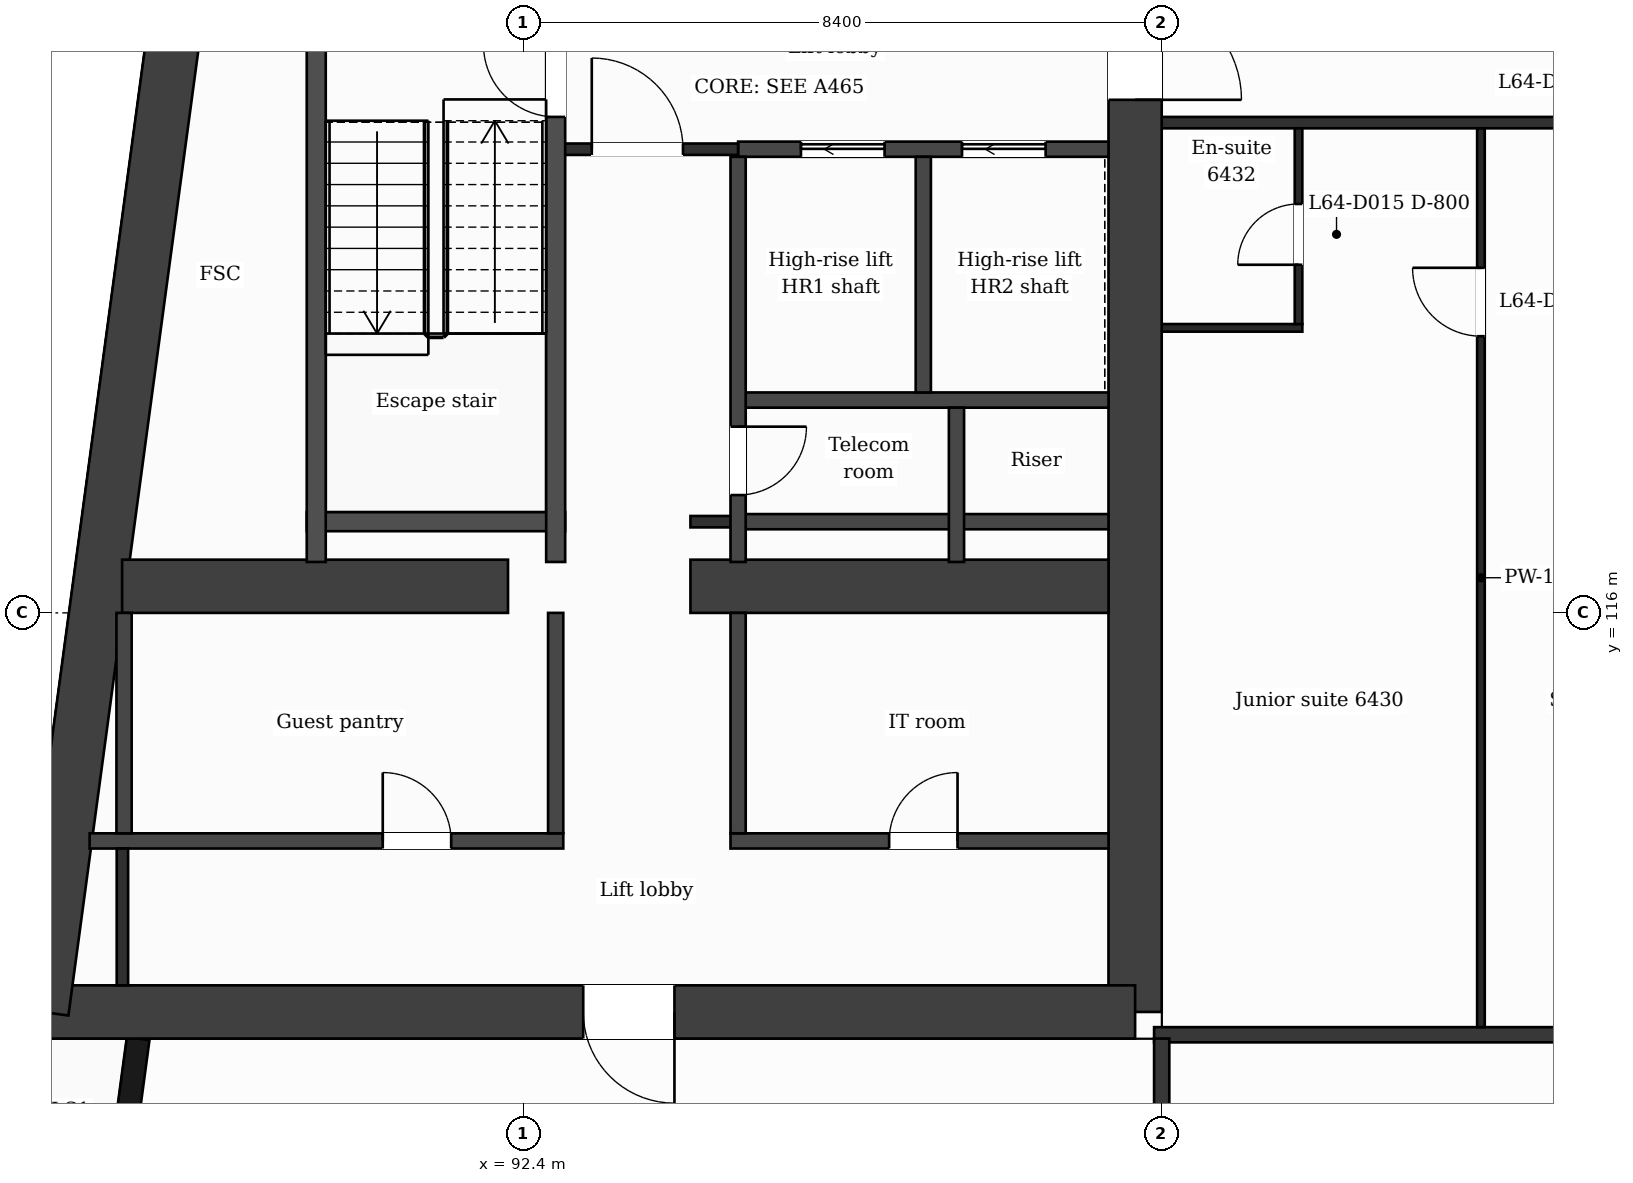
"""IFC4 building model, lengths in metres.
Left out: names, types, materials, properties, quantities, classifications, styles, units other than length and angle.
Written with IfcOpenShell. Run it as: python <this file> out.ifc"""

import sys

from ifc_helpers import new_model, si_unit, direction, frame, frame_2d, origin, place, context, subcontext, project, spatial, rectangle, extrude, element, fill, save


model = new_model("IFC4")
c1 = context("Model", 3, precision=1e-05, world=origin(), true_north=direction((0.0, 1.0)))
c2 = subcontext(c1, "Body", "Model", "MODEL_VIEW")
j1 = project(units=[si_unit("LENGTHUNIT", "METRE"), si_unit("PLANEANGLEUNIT", "RADIAN")], contexts=[c1])
p1 = place(None, origin())
s1 = spatial("IfcSite", under=j1, at=p1, CompositionType="ELEMENT")
p2 = place(p1, origin())
s2 = spatial("IfcBuilding", under=s1, at=p2, CompositionType="ELEMENT")
p3 = place(p2, frame((0.0, 0.0, 266.4)))
s3 = spatial("IfcBuildingStorey", under=s2, at=p3, CompositionType="ELEMENT", Elevation=266.4)
p4 = place(p3, frame((100.45, 132.05, 0.0), z_axis=(0.0, 0.0, 1.0), x_axis=(0.0, -1.0, 0.0)))
e1 = element("IfcWall", 1, at=p4, inside=s3, PredefinedType="SHEAR", context=c2, shape_type="SweptSolid", body=[
    extrude(rectangle(XDim=21.3, YDim=0.7, at=frame_2d((10.65, 0.0))), origin(), (0.0, 0.0, 1.0), 3.7),
])
p5 = place(p4, frame((7.9, 0.0, 0.0)))
e2 = element("IfcOpeningElement", 2, at=p5, cuts=e1, PredefinedType="OPENING", context=c2, shape_type="SweptSolid", body=[
    extrude(rectangle(XDim=1.4, YDim=2.1, at=frame_2d((0.7, 1.05))), frame((0.0, 0.36, 0.0), z_axis=(0.0, -1.0, 0.0), x_axis=(1.0, 0.0, 0.0)), (0.0, 0.0, 1.0), 0.72),
])
p6 = place(p3, frame((100.45, 110.75, 0.0), z_axis=(0.0, 0.0, 1.0), x_axis=(-1.0, 0.0, 0.0)))
e3 = element("IfcWall", 3, at=p6, inside=s3, PredefinedType="SHEAR", context=c2, shape_type="SweptSolid", body=[
    extrude(rectangle(XDim=14.38, YDim=0.7, at=frame_2d((7.19, 0.0))), origin(), (0.0, 0.0, 1.0), 3.7),
])
p7 = place(p6, frame((6.06, 0.0, 0.0)))
e4 = element("IfcOpeningElement", 4, at=p7, cuts=e3, PredefinedType="OPENING", context=c2, shape_type="SweptSolid", body=[
    extrude(rectangle(XDim=1.2, YDim=2.1, at=frame_2d((0.6, 1.05))), frame((0.0, 0.36, 0.0), z_axis=(0.0, -1.0, 0.0), x_axis=(1.0, 0.0, 0.0)), (0.0, 0.0, 1.0), 0.72),
])
p8 = place(p3, frame((86.07, 110.75, 0.0), z_axis=(0.0, 0.0, 1.0), x_axis=(0.133406218907, 0.991061441464, 0.0)))
e5 = element("IfcWall", 5, at=p8, inside=s3, PredefinedType="SHEAR", context=c2, shape_type="SweptSolid", body=[
    extrude(rectangle(XDim=21.492, YDim=0.7, at=frame_2d((10.746, 0.0))), origin(), (0.0, 0.0, 1.0), 3.7),
])
p9 = place(p3, frame((87.123, 116.35, 0.0), z_axis=(0.0, 0.0, 1.0), x_axis=(1.0, 0.0, 0.0)))
e6 = element("IfcWall", 6, at=p9, inside=s3, PredefinedType="SHEAR", context=c2, shape_type="SweptSolid", body=[
    extrude(rectangle(XDim=5.077, YDim=0.7, at=frame_2d((2.539, 0.0))), origin(), (0.0, 0.0, 1.0), 3.7),
])
p10 = place(p3, frame((94.6, 116.35, 0.0), z_axis=(0.0, 0.0, 1.0), x_axis=(1.0, 0.0, 0.0)))
e7 = element("IfcWall", 7, at=p10, inside=s3, PredefinedType="SHEAR", context=c2, shape_type="SweptSolid", body=[
    extrude(rectangle(XDim=5.5, YDim=0.7, at=frame_2d((2.75, 0.0))), origin(), (0.0, 0.0, 1.0), 3.7),
])
p11 = place(p3, frame((87.334, 110.4, 0.0), z_axis=(0.0, 0.0, 1.0), x_axis=(-0.13345962011, -0.991054251694, 0.0)))
e8 = element("IfcWall", 8, at=p11, inside=s3, PredefinedType="SOLIDWALL", context=c2, shape_type="SweptSolid", body=[
    extrude(rectangle(XDim=1.937, YDim=0.3, at=frame_2d((0.969, 0.0))), origin(), (0.0, 0.0, 1.0), 3.38),
])
p12 = place(p3, frame((100.7, 110.45, 0.0), z_axis=(0.0, 0.0, 1.0), x_axis=(1.0, 0.0, 0.0)))
e9 = element("IfcWall", 9, at=p12, inside=s3, PredefinedType="PARTITIONING", context=c2, shape_type="SweptSolid", body=[
    extrude(rectangle(XDim=25.4, YDim=0.2, at=frame_2d((12.7, 0.0))), origin(), (0.0, 0.0, 1.0), 3.38),
])
p13 = place(p3, frame((86.696, 113.0, 0.0), z_axis=(0.0, 0.0, 1.0), x_axis=(1.0, 0.0, 0.0)))
e10 = element("IfcWall", 10, at=p13, inside=s3, PredefinedType="PARTITIONING", context=c2, shape_type="SweptSolid", body=[
    extrude(rectangle(XDim=6.231, YDim=0.2, at=frame_2d((3.116, 0.0))), origin(), (0.0, 0.0, 1.0), 3.38),
])
p14 = place(p13, frame((3.856, 0.0, 0.0)))
e11 = element("IfcOpeningElement", 11, at=p14, cuts=e10, PredefinedType="OPENING", context=c2, shape_type="SweptSolid", body=[
    extrude(rectangle(XDim=0.9, YDim=2.1, at=frame_2d((0.45, 1.05))), frame((0.0, 0.11, 0.0), z_axis=(0.0, -1.0, 0.0), x_axis=(1.0, 0.0, 0.0)), (0.0, 0.0, 1.0), 0.22),
])
p15 = place(p3, frame((95.127, 113.0, 0.0), z_axis=(0.0, 0.0, 1.0), x_axis=(1.0, 0.0, 0.0)))
e12 = element("IfcWall", 12, at=p15, inside=s3, PredefinedType="PARTITIONING", context=c2, shape_type="SweptSolid", body=[
    extrude(rectangle(XDim=4.973, YDim=0.2, at=frame_2d((2.487, 0.0))), origin(), (0.0, 0.0, 1.0), 3.38),
])
p16 = place(p15, frame((2.087, 0.0, 0.0)))
e13 = element("IfcOpeningElement", 13, at=p16, cuts=e12, PredefinedType="OPENING", context=c2, shape_type="SweptSolid", body=[
    extrude(rectangle(XDim=0.9, YDim=2.1, at=frame_2d((0.45, 1.05))), frame((0.0, 0.11, 0.0), z_axis=(0.0, -1.0, 0.0), x_axis=(1.0, 0.0, 0.0)), (0.0, 0.0, 1.0), 0.22),
])
p17 = place(p3, frame((95.227, 117.2, 0.0), z_axis=(0.0, 0.0, 1.0), x_axis=(1.0, 0.0, 0.0)))
e14 = element("IfcWall", 14, at=p17, inside=s3, PredefinedType="PARTITIONING", context=c2, shape_type="SweptSolid", body=[
    extrude(rectangle(XDim=4.873, YDim=0.2, at=frame_2d((2.437, 0.0))), origin(), (0.0, 0.0, 1.0), 3.38),
])
p18 = place(p3, frame((94.6, 117.2, 0.0), z_axis=(0.0, 0.0, 1.0), x_axis=(1.0, 0.0, 0.0)))
e15 = element("IfcWall", 15, at=p18, inside=s3, PredefinedType="PARTITIONING", context=c2, shape_type="SweptSolid", body=[
    extrude(rectangle(XDim=0.627, YDim=0.15, at=frame_2d((0.313, 0.0))), origin(), (0.0, 0.0, 1.0), 3.38),
])
p19 = place(p3, frame((89.552, 117.2, 0.0), z_axis=(0.0, 0.0, 1.0), x_axis=(1.0, 0.0, 0.0)))
e16 = element("IfcWall", 16, at=p19, inside=s3, PredefinedType="PARTITIONING", context=c2, shape_type="SweptSolid", body=[
    extrude(rectangle(XDim=3.4, YDim=0.25, at=frame_2d((1.7, 0.0))), origin(), (0.0, 0.0, 1.0), 3.38),
])
p20 = place(p3, frame((95.227, 118.8, 0.0), z_axis=(0.0, 0.0, 1.0), x_axis=(1.0, 0.0, 0.0)))
e17 = element("IfcWall", 17, at=p20, inside=s3, PredefinedType="PARTITIONING", context=c2, shape_type="SweptSolid", body=[
    extrude(rectangle(XDim=4.873, YDim=0.2, at=frame_2d((2.437, 0.0))), origin(), (0.0, 0.0, 1.0), 3.38),
])
p21 = place(p3, frame((100.8, 119.75, 0.0), z_axis=(0.0, 0.0, 1.0), x_axis=(1.0, 0.0, 0.0)))
e18 = element("IfcWall", 18, at=p21, inside=s3, PredefinedType="PARTITIONING", context=c2, shape_type="SweptSolid", body=[
    extrude(rectangle(XDim=1.85, YDim=0.1, at=frame_2d((0.925, 0.0))), origin(), (0.0, 0.0, 1.0), 3.38),
])
p22 = place(p3, frame((95.227, 122.1, 0.0), z_axis=(0.0, 0.0, 1.0), x_axis=(1.0, 0.0, 0.0)))
e19 = element("IfcWall", 19, at=p22, inside=s3, PredefinedType="PARTITIONING", context=c2, shape_type="SweptSolid", body=[
    extrude(rectangle(XDim=4.873, YDim=0.2, at=frame_2d((2.437, 0.0))), origin(), (0.0, 0.0, 1.0), 3.38),
])
p23 = place(p22, frame((0.827, 0.0, 0.0)))
e20 = element("IfcOpeningElement", 20, at=p23, cuts=e19, PredefinedType="OPENING", context=c2, shape_type="SweptSolid", body=[
    extrude(rectangle(XDim=1.1, YDim=2.1, at=frame_2d((0.55, 1.05))), frame((0.0, 0.11, 0.0), z_axis=(0.0, -1.0, 0.0), x_axis=(1.0, 0.0, 0.0)), (0.0, 0.0, 1.0), 0.22),
])
p24 = place(p22, frame((2.946, 0.0, 0.0)))
e21 = element("IfcOpeningElement", 21, at=p24, cuts=e19, PredefinedType="OPENING", context=c2, shape_type="SweptSolid", body=[
    extrude(rectangle(XDim=1.1, YDim=2.1, at=frame_2d((0.55, 1.05))), frame((0.0, 0.11, 0.0), z_axis=(0.0, -1.0, 0.0), x_axis=(1.0, 0.0, 0.0)), (0.0, 0.0, 1.0), 0.22),
])
p25 = place(p3, frame((92.827, 122.1, 0.0), z_axis=(0.0, 0.0, 1.0), x_axis=(1.0, 0.0, 0.0)))
e22 = element("IfcWall", 22, at=p25, inside=s3, PredefinedType="PARTITIONING", context=c2, shape_type="SweptSolid", body=[
    extrude(rectangle(XDim=2.4, YDim=0.15, at=frame_2d((1.2, 0.0))), origin(), (0.0, 0.0, 1.0), 3.38),
])
p26 = place(p25, frame((0.475, 0.0, 0.0)))
e23 = element("IfcOpeningElement", 23, at=p26, cuts=e22, PredefinedType="OPENING", context=c2, shape_type="SweptSolid", body=[
    extrude(rectangle(XDim=1.2, YDim=2.1, at=frame_2d((0.6, 1.05))), frame((0.0, 0.085, 0.0), z_axis=(0.0, -1.0, 0.0), x_axis=(1.0, 0.0, 0.0)), (0.0, 0.0, 1.0), 0.17),
])
p27 = place(p3, frame((100.8, 122.45, 0.0), z_axis=(0.0, 0.0, 1.0), x_axis=(1.0, 0.0, 0.0)))
e24 = element("IfcWall", 24, at=p27, inside=s3, PredefinedType="PARTITIONING", context=c2, shape_type="SweptSolid", body=[
    extrude(rectangle(XDim=25.2, YDim=0.15, at=frame_2d((12.6, 0.0))), origin(), (0.0, 0.0, 1.0), 3.38),
])
p28 = place(p27, frame((5.55, 0.0, 0.0)))
e25 = element("IfcOpeningElement", 25, at=p28, cuts=e24, PredefinedType="OPENING", context=c2, shape_type="SweptSolid", body=[
    extrude(rectangle(XDim=1.0, YDim=2.1, at=frame_2d((0.5, 1.05))), frame((0.0, 0.085, 0.0), z_axis=(0.0, -1.0, 0.0), x_axis=(1.0, 0.0, 0.0)), (0.0, 0.0, 1.0), 0.17),
])
p29 = place(p27, frame((8.65, 0.0, 0.0)))
e26 = element("IfcOpeningElement", 26, at=p29, cuts=e24, PredefinedType="OPENING", context=c2, shape_type="SweptSolid", body=[
    extrude(rectangle(XDim=1.0, YDim=2.1, at=frame_2d((0.5, 1.05))), frame((0.0, 0.085, 0.0), z_axis=(0.0, -1.0, 0.0), x_axis=(1.0, 0.0, 0.0)), (0.0, 0.0, 1.0), 0.17),
])
p30 = place(p27, frame((19.83, 0.0, 0.0)))
e27 = element("IfcOpeningElement", 27, at=p30, cuts=e24, PredefinedType="OPENING", context=c2, shape_type="SweptSolid", body=[
    extrude(rectangle(XDim=1.0, YDim=2.1, at=frame_2d((0.5, 1.05))), frame((0.0, 0.085, 0.0), z_axis=(0.0, -1.0, 0.0), x_axis=(1.0, 0.0, 0.0)), (0.0, 0.0, 1.0), 0.17),
])
p31 = place(p3, frame((87.148, 113.1, 0.0), z_axis=(0.0, 0.0, 1.0), x_axis=(0.0, 1.0, 0.0)))
e28 = element("IfcWall", 28, at=p31, inside=s3, PredefinedType="PARTITIONING", context=c2, shape_type="SweptSolid", body=[
    extrude(rectangle(XDim=2.9, YDim=0.2, at=frame_2d((1.45, 0.0))), origin(), (0.0, 0.0, 1.0), 3.38),
])
p32 = place(p3, frame((87.127, 111.1, 0.0), z_axis=(0.0, 0.0, 1.0), x_axis=(0.0, 1.0, 0.0)))
e29 = element("IfcWall", 29, at=p32, inside=s3, PredefinedType="PARTITIONING", context=c2, shape_type="SweptSolid", body=[
    extrude(rectangle(XDim=1.8, YDim=0.15, at=frame_2d((0.9, 0.0))), origin(), (0.0, 0.0, 1.0), 3.38),
])
p33 = place(p3, frame((89.677, 116.67, 0.0), z_axis=(0.0, 0.0, 1.0), x_axis=(0.0, 1.0, 0.0)))
e30 = element("IfcWall", 30, at=p33, inside=s3, PredefinedType="PARTITIONING", context=c2, shape_type="SweptSolid", body=[
    extrude(rectangle(XDim=7.155, YDim=0.25, at=frame_2d((3.578, 0.0))), origin(), (0.0, 0.0, 1.0), 3.38),
])
p34 = place(p3, frame((92.827, 113.1, 0.0), z_axis=(0.0, 0.0, 1.0), x_axis=(0.0, 1.0, 0.0)))
e31 = element("IfcWall", 31, at=p34, inside=s3, PredefinedType="PARTITIONING", context=c2, shape_type="SweptSolid", body=[
    extrude(rectangle(XDim=2.9, YDim=0.2, at=frame_2d((1.45, 0.0))), origin(), (0.0, 0.0, 1.0), 3.38),
])
p35 = place(p3, frame((92.827, 116.67, 0.0), z_axis=(0.0, 0.0, 1.0), x_axis=(0.0, 1.0, 0.0)))
e32 = element("IfcWall", 32, at=p35, inside=s3, PredefinedType="PARTITIONING", context=c2, shape_type="SweptSolid", body=[
    extrude(rectangle(XDim=7.155, YDim=0.25, at=frame_2d((3.578, 0.0))), origin(), (0.0, 0.0, 1.0), 3.38),
])
p36 = place(p35, frame((5.855, 0.0, 0.0)))
e33 = element("IfcOpeningElement", 33, at=p36, cuts=e32, PredefinedType="OPENING", context=c2, shape_type="SweptSolid", body=[
    extrude(rectangle(XDim=0.95, YDim=2.1, at=frame_2d((0.475, 1.05))), frame((0.0, 0.135, 0.0), z_axis=(0.0, -1.0, 0.0), x_axis=(1.0, 0.0, 0.0)), (0.0, 0.0, 1.0), 0.27),
])
p37 = place(p3, frame((95.227, 113.1, 0.0), z_axis=(0.0, 0.0, 1.0), x_axis=(0.0, 1.0, 0.0)))
e34 = element("IfcWall", 34, at=p37, inside=s3, PredefinedType="PARTITIONING", context=c2, shape_type="SweptSolid", body=[
    extrude(rectangle(XDim=2.9, YDim=0.2, at=frame_2d((1.45, 0.0))), origin(), (0.0, 0.0, 1.0), 3.38),
])
p38 = place(p3, frame((95.227, 116.67, 0.0), z_axis=(0.0, 0.0, 1.0), x_axis=(0.0, 1.0, 0.0)))
e35 = element("IfcWall", 35, at=p38, inside=s3, PredefinedType="PARTITIONING", context=c2, shape_type="SweptSolid", body=[
    extrude(rectangle(XDim=5.33, YDim=0.2, at=frame_2d((2.665, 0.0))), origin(), (0.0, 0.0, 1.0), 3.38),
])
p39 = place(p38, frame((0.88, 0.0, 0.0)))
e36 = element("IfcOpeningElement", 36, at=p39, cuts=e35, PredefinedType="OPENING", context=c2, shape_type="SweptSolid", body=[
    extrude(rectangle(XDim=0.9, YDim=2.1, at=frame_2d((0.45, 1.05))), frame((0.0, 0.11, 0.0), z_axis=(0.0, -1.0, 0.0), x_axis=(1.0, 0.0, 0.0)), (0.0, 0.0, 1.0), 0.22),
])
p40 = place(p3, frame((97.664, 118.9, 0.0), z_axis=(0.0, 0.0, 1.0), x_axis=(0.0, 1.0, 0.0)))
e37 = element("IfcWall", 37, at=p40, inside=s3, PredefinedType="PARTITIONING", context=c2, shape_type="SweptSolid", body=[
    extrude(rectangle(XDim=3.1, YDim=0.2, at=frame_2d((1.55, 0.0))), origin(), (0.0, 0.0, 1.0), 3.38),
])
p41 = place(p3, frame((98.1, 116.67, 0.0), z_axis=(0.0, 0.0, 1.0), x_axis=(0.0, 1.0, 0.0)))
e38 = element("IfcWall", 38, at=p41, inside=s3, PredefinedType="PARTITIONING", context=c2, shape_type="SweptSolid", body=[
    extrude(rectangle(XDim=2.03, YDim=0.2, at=frame_2d((1.015, 0.0))), origin(), (0.0, 0.0, 1.0), 3.38),
])
p42 = place(p3, frame((100.8, 108.79, 0.0), z_axis=(0.0, 0.0, 1.0), x_axis=(0.0, 1.0, 0.0)))
e39 = element("IfcWall", 39, at=p42, inside=s3, PredefinedType="PARTITIONING", context=c2, shape_type="SweptSolid", body=[
    extrude(rectangle(XDim=1.61, YDim=0.2, at=frame_2d((0.805, 0.0))), origin(), (0.0, 0.0, 1.0), 3.38),
])
p43 = place(p3, frame((102.6, 119.8, 0.0), z_axis=(0.0, 0.0, 1.0), x_axis=(0.0, 1.0, 0.0)))
e40 = element("IfcWall", 40, at=p43, inside=s3, PredefinedType="PARTITIONING", context=c2, shape_type="SweptSolid", body=[
    extrude(rectangle(XDim=2.575, YDim=0.1, at=frame_2d((1.288, 0.0))), origin(), (0.0, 0.0, 1.0), 3.38),
])
p44 = place(p43, frame((0.78, 0.0, 0.0)))
e41 = element("IfcOpeningElement", 41, at=p44, cuts=e40, PredefinedType="OPENING", context=c2, shape_type="SweptSolid", body=[
    extrude(rectangle(XDim=0.8, YDim=2.1, at=frame_2d((0.4, 1.05))), frame((0.0, 0.06, 0.0), z_axis=(0.0, -1.0, 0.0), x_axis=(1.0, 0.0, 0.0)), (0.0, 0.0, 1.0), 0.12),
])
p45 = place(p3, frame((105.0, 110.55, 0.0), z_axis=(0.0, 0.0, 1.0), x_axis=(0.0, 1.0, 0.0)))
e42 = element("IfcWall", 42, at=p45, inside=s3, PredefinedType="PARTITIONING", context=c2, shape_type="SweptSolid", body=[
    extrude(rectangle(XDim=11.825, YDim=0.1, at=frame_2d((5.913, 0.0))), origin(), (0.0, 0.0, 1.0), 3.38),
])
p46 = place(p45, frame((9.09, 0.0, 0.0)))
e43 = element("IfcOpeningElement", 43, at=p46, cuts=e42, PredefinedType="OPENING", context=c2, shape_type="SweptSolid", body=[
    extrude(rectangle(XDim=0.9, YDim=2.1, at=frame_2d((0.45, 1.05))), frame((0.0, 0.06, 0.0), z_axis=(0.0, -1.0, 0.0), x_axis=(1.0, 0.0, 0.0)), (0.0, 0.0, 1.0), 0.12),
])
p47 = place(p26, origin())
e44 = element("IfcDoor", 44, at=p47, inside=s3, OperationType="SINGLE_SWING_LEFT", PredefinedType="DOOR", context=c2, shape_type="SweptSolid", body=[
    extrude(rectangle(XDim=1.2, YDim=2.1, at=frame_2d((0.6, 1.05))), frame((0.0, 0.025, 0.0), z_axis=(0.0, -1.0, 0.0), x_axis=(1.0, 0.0, 0.0)), (0.0, 0.0, 1.0), 0.05),
])
fill(e23, e44)
p48 = place(p23, origin())
e45 = element("IfcDoor", 45, at=p48, inside=s3, OperationType="SLIDING_TO_LEFT", PredefinedType="DOOR", context=c2, shape_type="SweptSolid", body=[
    extrude(rectangle(XDim=1.1, YDim=2.1, at=frame_2d((0.55, 1.05))), frame((0.0, 0.025, 0.0), z_axis=(0.0, -1.0, 0.0), x_axis=(1.0, 0.0, 0.0)), (0.0, 0.0, 1.0), 0.05),
])
fill(e20, e45)
p49 = place(p24, origin())
e46 = element("IfcDoor", 46, at=p49, inside=s3, OperationType="SLIDING_TO_LEFT", PredefinedType="DOOR", context=c2, shape_type="SweptSolid", body=[
    extrude(rectangle(XDim=1.1, YDim=2.1, at=frame_2d((0.55, 1.05))), frame((0.0, 0.025, 0.0), z_axis=(0.0, -1.0, 0.0), x_axis=(1.0, 0.0, 0.0)), (0.0, 0.0, 1.0), 0.05),
])
fill(e21, e46)
p50 = place(p36, origin())
e47 = element("IfcDoor", 47, at=p50, inside=s3, OperationType="SINGLE_SWING_RIGHT", PredefinedType="DOOR", context=c2, shape_type="SweptSolid", body=[
    extrude(rectangle(XDim=0.95, YDim=2.1, at=frame_2d((0.475, 1.05))), frame((0.0, 0.025, 0.0), z_axis=(0.0, -1.0, 0.0), x_axis=(1.0, 0.0, 0.0)), (0.0, 0.0, 1.0), 0.05),
])
fill(e33, e47)
p51 = place(p39, origin())
e48 = element("IfcDoor", 48, at=p51, inside=s3, OperationType="SINGLE_SWING_RIGHT", PredefinedType="DOOR", context=c2, shape_type="SweptSolid", body=[
    extrude(rectangle(XDim=0.9, YDim=2.1, at=frame_2d((0.45, 1.05))), frame((0.0, 0.025, 0.0), z_axis=(0.0, -1.0, 0.0), x_axis=(1.0, 0.0, 0.0)), (0.0, 0.0, 1.0), 0.05),
])
fill(e36, e48)
p52 = place(p14, origin())
e49 = element("IfcDoor", 49, at=p52, inside=s3, OperationType="SINGLE_SWING_LEFT", PredefinedType="DOOR", context=c2, shape_type="SweptSolid", body=[
    extrude(rectangle(XDim=0.9, YDim=2.1, at=frame_2d((0.45, 1.05))), frame((0.0, 0.025, 0.0), z_axis=(0.0, -1.0, 0.0), x_axis=(1.0, 0.0, 0.0)), (0.0, 0.0, 1.0), 0.05),
])
fill(e11, e49)
p53 = place(p16, origin())
e50 = element("IfcDoor", 50, at=p53, inside=s3, OperationType="SINGLE_SWING_RIGHT", PredefinedType="DOOR", context=c2, shape_type="SweptSolid", body=[
    extrude(rectangle(XDim=0.9, YDim=2.1, at=frame_2d((0.45, 1.05))), frame((0.0, 0.025, 0.0), z_axis=(0.0, -1.0, 0.0), x_axis=(1.0, 0.0, 0.0)), (0.0, 0.0, 1.0), 0.05),
])
fill(e13, e50)
p54 = place(p46, origin())
e51 = element("IfcDoor", 51, at=p54, inside=s3, OperationType="SINGLE_SWING_RIGHT", PredefinedType="DOOR", context=c2, shape_type="SweptSolid", body=[
    extrude(rectangle(XDim=0.9, YDim=2.1, at=frame_2d((0.45, 1.05))), frame((0.0, 0.025, 0.0), z_axis=(0.0, -1.0, 0.0), x_axis=(1.0, 0.0, 0.0)), (0.0, 0.0, 1.0), 0.05),
])
fill(e43, e51)
p55 = place(p44, origin())
e52 = element("IfcDoor", 52, at=p55, inside=s3, OperationType="SINGLE_SWING_LEFT", PredefinedType="DOOR", context=c2, shape_type="SweptSolid", body=[
    extrude(rectangle(XDim=0.8, YDim=2.1, at=frame_2d((0.4, 1.05))), frame((0.0, 0.025, 0.0), z_axis=(0.0, -1.0, 0.0), x_axis=(1.0, 0.0, 0.0)), (0.0, 0.0, 1.0), 0.05),
])
fill(e41, e52)
p56 = place(p7, origin())
e53 = element("IfcDoor", 53, at=p56, inside=s3, OperationType="SINGLE_SWING_LEFT", PredefinedType="DOOR", context=c2, shape_type="SweptSolid", body=[
    extrude(rectangle(XDim=1.2, YDim=2.1, at=frame_2d((0.6, 1.05))), frame((0.0, 0.025, 0.0), z_axis=(0.0, -1.0, 0.0), x_axis=(1.0, 0.0, 0.0)), (0.0, 0.0, 1.0), 0.05),
])
fill(e4, e53)
p57 = place(p5, origin())
e54 = element("IfcDoor", 54, at=p57, inside=s3, OperationType="SINGLE_SWING_RIGHT", PredefinedType="DOOR", context=c2, shape_type="SweptSolid", body=[
    extrude(rectangle(XDim=1.4, YDim=2.1, at=frame_2d((0.7, 1.05))), frame((0.0, 0.025, 0.0), z_axis=(0.0, -1.0, 0.0), x_axis=(1.0, 0.0, 0.0)), (0.0, 0.0, 1.0), 0.05),
])
fill(e2, e54)
save(model, sys.argv[1])
